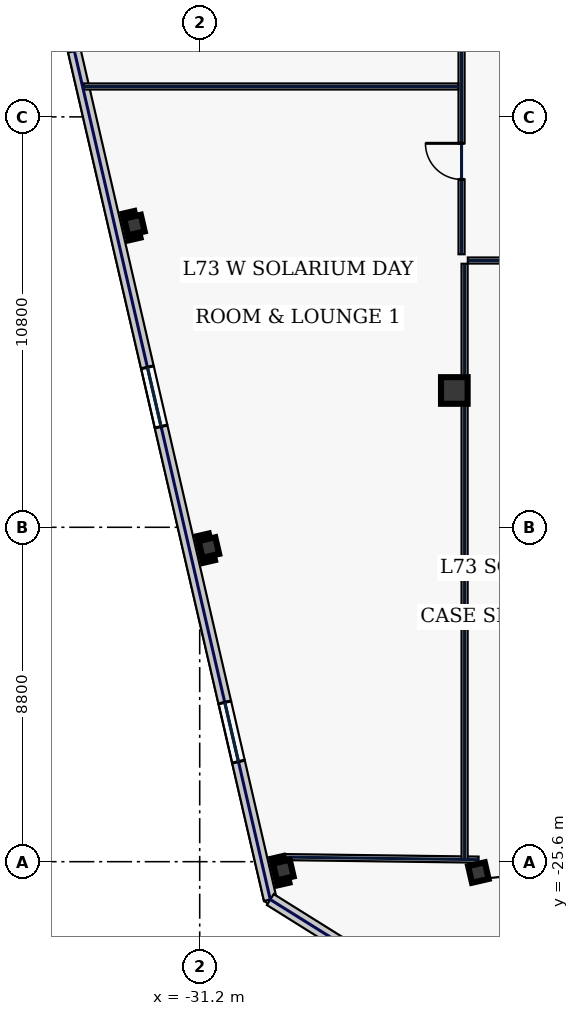
"""IFC4 building model, lengths in metres.
Left out: names, types, materials, properties, quantities, classifications, styles, units other than length and angle.
Written with IfcOpenShell. Run it as: python <this file> out.ifc"""

import sys

from ifc_helpers import new_model, si_unit, direction, frame, frame_2d, origin, origin_2d, place, context, subcontext, project, spatial, rectangle, hollow_rectangle, extrude, element, fill, save


model = new_model("IFC4")
c1 = context("Model", 3, precision=1e-05, world=origin(), true_north=direction((0.0, 1.0)))
c2 = subcontext(c1, "Body", "Model", "MODEL_VIEW")
j1 = project(units=[si_unit("LENGTHUNIT", "METRE"), si_unit("PLANEANGLEUNIT", "RADIAN")], contexts=[c1])
p1 = place(None, origin())
s1 = spatial("IfcSite", under=j1, at=p1, CompositionType="ELEMENT")
p2 = place(p1, origin())
s2 = spatial("IfcBuilding", under=s1, at=p2, CompositionType="ELEMENT")
p3 = place(p2, frame((0.0, 0.0, 313.0)))
s3 = spatial("IfcBuildingStorey", under=s2, at=p3, CompositionType="ELEMENT", Elevation=313.0)
p4 = place(p3, frame((-24.5, -13.2, 0.0), z_axis=(0.0, 0.0, 1.0), x_axis=(1.0, 0.0, 0.0)))
e1 = element("IfcColumn", 1, at=p4, inside=s3, PredefinedType="COLUMN", context=c2, shape_type="SweptSolid", body=[
    extrude(hollow_rectangle(XDim=0.7, YDim=0.7, WallThickness=0.032, at=origin_2d()), origin(), (0.0, 0.0, 1.0), 3.74),
])
for number, where, z_axis, x_axis in (
    (2, (-23.867, -25.886, 0.0), (0.0, 0.0, 1.0), (0.974, 0.225, 0.0)),
    (3, (-32.917, -8.845, 0.0), (0.0, 0.0, 1.0), (0.974, 0.225, 0.0)),
    (4, (-30.958, -17.332, 0.0), (0.0, 0.0, 1.0), (0.974, 0.225, 0.0)),
    (5, (-28.999, -25.819, 0.0), (0.0, 0.0, 1.0), (0.974, 0.225, 0.0)),
):
    element("IfcColumn", number, at=place(p3, frame(where, z_axis=z_axis, x_axis=x_axis)), inside=s3, PredefinedType="COLUMN", context=c2, shape_type="SweptSolid", body=[
        extrude(hollow_rectangle(XDim=0.45, YDim=0.45, WallThickness=0.022, at=origin_2d()), origin(), (0.0, 0.0, 1.0), 3.74),
    ])
p5 = place(p3, frame((-24.03, -29.916, 0.0), z_axis=(0.0, 0.0, 1.0), x_axis=(0.974370978061, 0.224947098473, 0.0)))
e6 = element("IfcWall", 6, at=p5, inside=s3, PredefinedType="STANDARD", context=c2, shape_type="SweptSolid", body=[
    extrude(rectangle(XDim=17.506, YDim=0.34, at=frame_2d((8.753, 0.0))), origin(), (0.0, 0.0, 1.0), 3.74),
])
p6 = place(p5, frame((2.35, 0.0, 0.9)))
e7 = element("IfcOpeningElement", 7, at=p6, cuts=e6, PredefinedType="OPENING", context=c2, shape_type="SweptSolid", body=[
    extrude(rectangle(XDim=1.5, YDim=2.0, at=frame_2d((0.75, 1.0))), frame((0.0, 0.18, 0.0), z_axis=(0.0, -1.0, 0.0), x_axis=(1.0, 0.0, 0.0)), (0.0, 0.0, 1.0), 0.36),
])
p7 = place(p5, frame((5.817, 0.0, 0.9)))
e8 = element("IfcOpeningElement", 8, at=p7, cuts=e6, PredefinedType="OPENING", context=c2, shape_type="SweptSolid", body=[
    extrude(rectangle(XDim=1.5, YDim=2.0, at=frame_2d((0.75, 1.0))), frame((0.0, 0.18, 0.0), z_axis=(0.0, -1.0, 0.0), x_axis=(1.0, 0.0, 0.0)), (0.0, 0.0, 1.0), 0.36),
])
p8 = place(p3, frame((-37.486, 8.676, 0.0), z_axis=(0.0, 0.0, 1.0), x_axis=(0.224953091034, -0.974369594576, 0.0)))
e9 = element("IfcWall", 9, at=p8, inside=s3, PredefinedType="STANDARD", context=c2, shape_type="SweptSolid", body=[
    extrude(rectangle(XDim=36.2, YDim=0.34, at=frame_2d((18.1, 0.0))), origin(), (0.0, 0.0, 1.0), 3.74),
])
p9 = place(p8, frame((4.825, 0.0, 0.75)))
e10 = element("IfcOpeningElement", 10, at=p9, cuts=e9, PredefinedType="OPENING", context=c2, shape_type="SweptSolid", body=[
    extrude(rectangle(XDim=0.85, YDim=1.85, at=frame_2d((0.425, 0.925))), frame((0.0, 0.18, 0.0), z_axis=(0.0, -1.0, 0.0), x_axis=(1.0, 0.0, 0.0)), (0.0, 0.0, 1.0), 0.36),
])
p10 = place(p8, frame((12.425, 0.0, 0.75)))
e11 = element("IfcOpeningElement", 11, at=p10, cuts=e9, PredefinedType="OPENING", context=c2, shape_type="SweptSolid", body=[
    extrude(rectangle(XDim=0.85, YDim=1.85, at=frame_2d((0.425, 0.925))), frame((0.0, 0.18, 0.0), z_axis=(0.0, -1.0, 0.0), x_axis=(1.0, 0.0, 0.0)), (0.0, 0.0, 1.0), 0.36),
])
p11 = place(p8, frame((21.825, 0.0, 0.58)))
e12 = element("IfcOpeningElement", 12, at=p11, cuts=e9, PredefinedType="OPENING", context=c2, shape_type="SweptSolid", body=[
    extrude(rectangle(XDim=1.6, YDim=2.3, at=frame_2d((0.8, 1.15))), frame((0.0, 0.18, 0.0), z_axis=(0.0, -1.0, 0.0), x_axis=(1.0, 0.0, 0.0)), (0.0, 0.0, 1.0), 0.36),
])
p12 = place(p8, frame((30.875, 0.0, 0.58)))
e13 = element("IfcOpeningElement", 13, at=p12, cuts=e9, PredefinedType="OPENING", context=c2, shape_type="SweptSolid", body=[
    extrude(rectangle(XDim=1.6, YDim=2.3, at=frame_2d((0.8, 1.15))), frame((0.0, 0.18, 0.0), z_axis=(0.0, -1.0, 0.0), x_axis=(1.0, 0.0, 0.0)), (0.0, 0.0, 1.0), 0.36),
])
p13 = place(p3, frame((-29.343, -26.596, 0.0), z_axis=(0.0, 0.0, 1.0), x_axis=(0.848037708252, -0.529935887993, 0.0)))
e14 = element("IfcWall", 14, at=p13, inside=s3, PredefinedType="STANDARD", context=c2, shape_type="SweptSolid", body=[
    extrude(rectangle(XDim=6.265, YDim=0.34, at=frame_2d((3.133, 0.0))), origin(), (0.0, 0.0, 1.0), 3.74),
])
p14 = place(p3, frame((-28.994, -25.479, 0.0), z_axis=(0.0, 0.0, 1.0), x_axis=(0.999915052546, -0.01303409726, 0.0)))
e15 = element("IfcWall", 15, at=p14, inside=s3, PredefinedType="PARTITIONING", context=c2, shape_type="SweptSolid", body=[
    extrude(rectangle(XDim=5.132, YDim=0.16, at=frame_2d((2.566, 0.0))), origin(), (0.0, 0.0, 1.0), 3.74),
])
p15 = place(p3, frame((-24.31, -9.615, 0.0), z_axis=(0.0, 0.0, 1.0), x_axis=(0.0, 1.0, 0.0)))
e16 = element("IfcWall", 16, at=p15, inside=s3, PredefinedType="PARTITIONING", context=c2, shape_type="SweptSolid", body=[
    extrude(rectangle(XDim=19.28, YDim=0.16, at=frame_2d((9.64, 0.0))), origin(), (0.0, 0.0, 1.0), 3.74),
])
p16 = place(p15, frame((1.969, 0.0, 0.0)))
e17 = element("IfcOpeningElement", 17, at=p16, cuts=e16, PredefinedType="OPENING", context=c2, shape_type="SweptSolid", body=[
    extrude(rectangle(XDim=0.95, YDim=2.2, at=frame_2d((0.475, 1.1))), frame((0.0, 0.09, 0.0), z_axis=(0.0, -1.0, 0.0), x_axis=(1.0, 0.0, 0.0)), (0.0, 0.0, 1.0), 0.18),
])
p17 = place(p15, frame((7.25, 0.0, 0.0)))
e18 = element("IfcOpeningElement", 18, at=p17, cuts=e16, PredefinedType="OPENING", context=c2, shape_type="SweptSolid", body=[
    extrude(rectangle(XDim=0.95, YDim=2.2, at=frame_2d((0.475, 1.1))), frame((0.0, 0.09, 0.0), z_axis=(0.0, -1.0, 0.0), x_axis=(1.0, 0.0, 0.0)), (0.0, 0.0, 1.0), 0.18),
])
p18 = place(p15, frame((12.45, 0.0, 0.0)))
e19 = element("IfcOpeningElement", 19, at=p18, cuts=e16, PredefinedType="OPENING", context=c2, shape_type="SweptSolid", body=[
    extrude(rectangle(XDim=0.95, YDim=2.2, at=frame_2d((0.475, 1.1))), frame((0.0, 0.09, 0.0), z_axis=(0.0, -1.0, 0.0), x_axis=(1.0, 0.0, 0.0)), (0.0, 0.0, 1.0), 0.18),
])
p19 = place(p15, frame((16.506, 0.0, 0.0)))
e20 = element("IfcOpeningElement", 20, at=p19, cuts=e16, PredefinedType="OPENING", context=c2, shape_type="SweptSolid", body=[
    extrude(rectangle(XDim=0.95, YDim=2.2, at=frame_2d((0.475, 1.1))), frame((0.0, 0.09, 0.0), z_axis=(0.0, -1.0, 0.0), x_axis=(1.0, 0.0, 0.0)), (0.0, 0.0, 1.0), 0.18),
])
p20 = place(p3, frame((-15.065, -9.78, 0.0), z_axis=(0.0, 0.0, 1.0), x_axis=(-1.0, 0.0, 0.0)))
e21 = element("IfcWall", 21, at=p20, inside=s3, PredefinedType="PARTITIONING", context=c2, shape_type="SweptSolid", body=[
    extrude(rectangle(XDim=9.08, YDim=0.16, at=frame_2d((4.54, 0.0))), origin(), (0.0, 0.0, 1.0), 3.74),
])
p21 = place(p20, frame((6.256, 0.0, 0.0)))
e22 = element("IfcOpeningElement", 22, at=p21, cuts=e21, PredefinedType="OPENING", context=c2, shape_type="SweptSolid", body=[
    extrude(rectangle(XDim=1.05, YDim=2.2, at=frame_2d((0.525, 1.1))), frame((0.0, 0.09, 0.0), z_axis=(0.0, -1.0, 0.0), x_axis=(1.0, 0.0, 0.0)), (0.0, 0.0, 1.0), 0.18),
])
p22 = place(p3, frame((-24.23, -25.536, 0.0), z_axis=(0.0, 0.0, 1.0), x_axis=(0.0, 1.0, 0.0)))
e23 = element("IfcWall", 23, at=p22, inside=s3, PredefinedType="PARTITIONING", context=c2, shape_type="SweptSolid", body=[
    extrude(rectangle(XDim=15.671, YDim=0.16, at=frame_2d((7.835, 0.0))), origin(), (0.0, 0.0, 1.0), 3.335),
])
p23 = place(p3, frame((-34.262, -5.2, 0.0), z_axis=(0.0, 0.0, 1.0), x_axis=(1.0, 0.0, 0.0)))
e24 = element("IfcWall", 24, at=p23, inside=s3, PredefinedType="PARTITIONING", context=c2, shape_type="SweptSolid", body=[
    extrude(rectangle(XDim=9.867, YDim=0.16, at=frame_2d((4.933, 0.0))), origin(), (0.0, 0.0, 1.0), 3.74),
])
p24 = place(p11, origin())
e25 = element("IfcWindow", 25, at=p24, inside=s3, PartitioningType="SINGLE_PANEL", PredefinedType="WINDOW", context=c2, shape_type="SweptSolid", body=[
    extrude(rectangle(XDim=1.6, YDim=2.3, at=frame_2d((0.8, 1.15))), frame((0.0, 0.03, 0.0), z_axis=(0.0, -1.0, 0.0), x_axis=(1.0, 0.0, 0.0)), (0.0, 0.0, 1.0), 0.06),
])
fill(e12, e25)
p25 = place(p12, origin())
e26 = element("IfcWindow", 26, at=p25, inside=s3, PartitioningType="SINGLE_PANEL", PredefinedType="WINDOW", context=c2, shape_type="SweptSolid", body=[
    extrude(rectangle(XDim=1.6, YDim=2.3, at=frame_2d((0.8, 1.15))), frame((0.0, 0.03, 0.0), z_axis=(0.0, -1.0, 0.0), x_axis=(1.0, 0.0, 0.0)), (0.0, 0.0, 1.0), 0.06),
])
fill(e13, e26)
p26 = place(p16, origin())
e27 = element("IfcDoor", 27, at=p26, inside=s3, OperationType="SINGLE_SWING_RIGHT", PredefinedType="DOOR", context=c2, shape_type="SweptSolid", body=[
    extrude(rectangle(XDim=0.95, YDim=2.2, at=frame_2d((0.475, 1.1))), frame((0.0, 0.025, 0.0), z_axis=(0.0, -1.0, 0.0), x_axis=(1.0, 0.0, 0.0)), (0.0, 0.0, 1.0), 0.05),
])
fill(e17, e27)
save(model, sys.argv[1])
